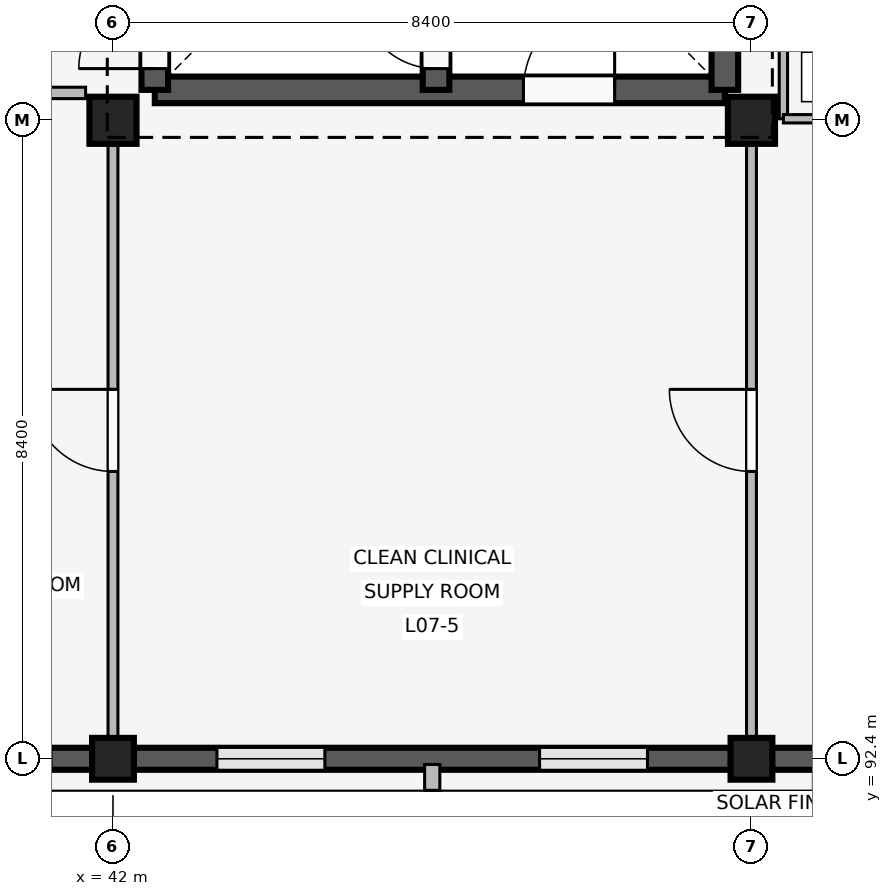
"""IFC4 building model, lengths in metres.
Left out: names, types, materials, properties, quantities, classifications, styles, units other than length and angle.
Written with IfcOpenShell. Run it as: python <this file> out.ifc"""

import sys

from ifc_helpers import new_model, si_unit, direction, frame, frame_2d, origin, origin_2d, place, context, subcontext, project, spatial, rectangle, extrude, element, fill, save


model = new_model("IFC4")
c1 = context("Model", 3, precision=1e-05, world=origin(), true_north=direction((0.0, 1.0)))
c2 = subcontext(c1, "Body", "Model", "MODEL_VIEW")
j1 = project(units=[si_unit("LENGTHUNIT", "METRE"), si_unit("PLANEANGLEUNIT", "RADIAN")], contexts=[c1])
p1 = place(None, origin())
s1 = spatial("IfcSite", under=j1, at=p1, CompositionType="ELEMENT")
p2 = place(p1, origin())
s2 = spatial("IfcBuilding", under=s1, at=p2, CompositionType="ELEMENT")
p3 = place(p2, frame((0.0, 0.0, 28.8)))
s3 = spatial("IfcBuildingStorey", under=s2, at=p3, CompositionType="ELEMENT", Elevation=28.8)
p4 = place(p3, frame((42.0, 92.4, 0.0), z_axis=(0.0, 0.0, 1.0), x_axis=(1.0, 0.0, 0.0)))
e1 = element("IfcColumn", 1, at=p4, inside=s3, PredefinedType="COLUMN", context=c2, shape_type="SweptSolid", body=[
    extrude(rectangle(XDim=0.55, YDim=0.55, at=origin_2d()), origin(), (0.0, 0.0, 1.0), 4.2),
])
p5 = place(p3, frame((42.0, 100.8, 0.0), z_axis=(0.0, 0.0, 1.0), x_axis=(1.0, 0.0, 0.0)))
e2 = element("IfcColumn", 2, at=p5, inside=s3, PredefinedType="COLUMN", context=c2, shape_type="SweptSolid", body=[
    extrude(rectangle(XDim=0.62, YDim=0.62, at=origin_2d()), origin(), (0.0, 0.0, 1.0), 4.2),
])
p6 = place(p3, frame((50.4, 92.4, 0.0), z_axis=(0.0, 0.0, 1.0), x_axis=(1.0, 0.0, 0.0)))
e3 = element("IfcColumn", 3, at=p6, inside=s3, PredefinedType="COLUMN", context=c2, shape_type="SweptSolid", body=[
    extrude(rectangle(XDim=0.55, YDim=0.55, at=origin_2d()), origin(), (0.0, 0.0, 1.0), 4.2),
])
p7 = place(p3, frame((50.4, 100.8, 0.0), z_axis=(0.0, 0.0, 1.0), x_axis=(1.0, 0.0, 0.0)))
e4 = element("IfcColumn", 4, at=p7, inside=s3, PredefinedType="COLUMN", context=c2, shape_type="SweptSolid", body=[
    extrude(rectangle(XDim=0.62, YDim=0.62, at=origin_2d()), origin(), (0.0, 0.0, 1.0), 4.2),
])
p8 = place(p3, frame((41.73, 92.4, 0.0), z_axis=(0.0, 0.0, 1.0), x_axis=(-1.0, 0.0, 0.0)))
e5 = element("IfcWall", 5, at=p8, inside=s3, PredefinedType="SOLIDWALL", context=c2, shape_type="SweptSolid", body=[
    extrude(rectangle(XDim=7.86, YDim=0.29, at=frame_2d((3.93, 0.0))), origin(), (0.0, 0.0, 1.0), 3.34),
])
p9 = place(p8, frame((0.545, 0.0, 0.85)))
e6 = element("IfcOpeningElement", 6, at=p9, cuts=e5, PredefinedType="OPENING", context=c2, shape_type="SweptSolid", body=[
    extrude(rectangle(XDim=1.48, YDim=1.6, at=frame_2d((0.74, 0.8))), frame((0.0, 0.155, 0.0), z_axis=(0.0, -1.0, 0.0), x_axis=(1.0, 0.0, 0.0)), (0.0, 0.0, 1.0), 0.31),
])
p10 = place(p8, frame((5.312, 0.0, 0.85)))
e7 = element("IfcOpeningElement", 7, at=p10, cuts=e5, PredefinedType="OPENING", context=c2, shape_type="SweptSolid", body=[
    extrude(rectangle(XDim=1.48, YDim=1.6, at=frame_2d((0.74, 0.8))), frame((0.0, 0.155, 0.0), z_axis=(0.0, -1.0, 0.0), x_axis=(1.0, 0.0, 0.0)), (0.0, 0.0, 1.0), 0.31),
])
p11 = place(p3, frame((50.13, 92.4, 0.0), z_axis=(0.0, 0.0, 1.0), x_axis=(-1.0, 0.0, 0.0)))
e8 = element("IfcWall", 8, at=p11, inside=s3, PredefinedType="SOLIDWALL", context=c2, shape_type="SweptSolid", body=[
    extrude(rectangle(XDim=7.86, YDim=0.29, at=frame_2d((3.93, 0.0))), origin(), (0.0, 0.0, 1.0), 3.34),
])
p12 = place(p11, frame((1.098, 0.0, 0.85)))
e9 = element("IfcOpeningElement", 9, at=p12, cuts=e8, PredefinedType="OPENING", context=c2, shape_type="SweptSolid", body=[
    extrude(rectangle(XDim=1.42, YDim=1.45, at=frame_2d((0.71, 0.725))), frame((0.0, 0.155, 0.0), z_axis=(0.0, -1.0, 0.0), x_axis=(1.0, 0.0, 0.0)), (0.0, 0.0, 1.0), 0.31),
])
p13 = place(p11, frame((5.342, 0.0, 0.85)))
e10 = element("IfcOpeningElement", 10, at=p13, cuts=e8, PredefinedType="OPENING", context=c2, shape_type="SweptSolid", body=[
    extrude(rectangle(XDim=1.42, YDim=1.45, at=frame_2d((0.71, 0.725))), frame((0.0, 0.155, 0.0), z_axis=(0.0, -1.0, 0.0), x_axis=(1.0, 0.0, 0.0)), (0.0, 0.0, 1.0), 0.31),
])
p14 = place(p3, frame((46.2, 92.325, 0.0), z_axis=(0.0, 0.0, 1.0), x_axis=(0.0, -1.0, 0.0)))
e11 = element("IfcWall", 11, at=p14, inside=s3, PredefinedType="ELEMENTEDWALL", context=c2, shape_type="SweptSolid", body=[
    extrude(rectangle(XDim=0.34, YDim=0.2, at=frame_2d((0.17, 0.0))), origin(), (0.0, 0.0, 1.0), 3.32),
])
p15 = place(p3, frame((58.53, 92.4, 0.0), z_axis=(0.0, 0.0, 1.0), x_axis=(-1.0, 0.0, 0.0)))
e12 = element("IfcWall", 12, at=p15, inside=s3, PredefinedType="SOLIDWALL", context=c2, shape_type="SweptSolid", body=[
    extrude(rectangle(XDim=7.86, YDim=0.29, at=frame_2d((3.93, 0.0))), origin(), (0.0, 0.0, 1.0), 3.34),
])
p16 = place(p15, frame((0.978, 0.0, 0.85)))
e13 = element("IfcOpeningElement", 13, at=p16, cuts=e12, PredefinedType="OPENING", context=c2, shape_type="SweptSolid", body=[
    extrude(rectangle(XDim=1.66, YDim=1.95, at=frame_2d((0.83, 0.975))), frame((0.0, 0.155, 0.0), z_axis=(0.0, -1.0, 0.0), x_axis=(1.0, 0.0, 0.0)), (0.0, 0.0, 1.0), 0.31),
])
p17 = place(p15, frame((5.222, 0.0, 0.85)))
e14 = element("IfcOpeningElement", 14, at=p17, cuts=e12, PredefinedType="OPENING", context=c2, shape_type="SweptSolid", body=[
    extrude(rectangle(XDim=1.66, YDim=1.95, at=frame_2d((0.83, 0.975))), frame((0.0, 0.155, 0.0), z_axis=(0.0, -1.0, 0.0), x_axis=(1.0, 0.0, 0.0)), (0.0, 0.0, 1.0), 0.31),
])
p18 = place(p3, frame((42.55, 101.2, 0.0), z_axis=(0.0, 0.0, 1.0), x_axis=(1.0, 0.0, 0.0)))
e15 = element("IfcWall", 15, at=p18, inside=s3, PredefinedType="SHEAR", context=c2, shape_type="SweptSolid", body=[
    extrude(rectangle(XDim=7.5, YDim=0.35, at=frame_2d((3.75, 0.0))), origin(), (0.0, 0.0, 1.0), 3.94),
])
p19 = place(p18, frame((4.85, 0.0, 0.0)))
e16 = element("IfcOpeningElement", 16, at=p19, cuts=e15, PredefinedType="OPENING", context=c2, shape_type="SweptSolid", body=[
    extrude(rectangle(XDim=1.2, YDim=2.2, at=frame_2d((0.6, 1.1))), frame((0.0, 0.185, 0.0), z_axis=(0.0, -1.0, 0.0), x_axis=(1.0, 0.0, 0.0)), (0.0, 0.0, 1.0), 0.37),
])
p20 = place(p3, frame((42.55, 101.2, 0.0), z_axis=(0.0, 0.0, 1.0), x_axis=(0.0, 1.0, 0.0)))
e17 = element("IfcWall", 17, at=p20, inside=s3, PredefinedType="SHEAR", context=c2, shape_type="SweptSolid", body=[
    extrude(rectangle(XDim=7.55, YDim=0.35, at=frame_2d((3.775, 0.0))), origin(), (0.0, 0.0, 1.0), 3.94),
])
p21 = place(p20, frame((0.28, 0.0, 0.0)))
e18 = element("IfcOpeningElement", 18, at=p21, cuts=e17, PredefinedType="OPENING", context=c2, shape_type="SweptSolid", body=[
    extrude(rectangle(XDim=1.0, YDim=2.15, at=frame_2d((0.5, 1.075))), frame((0.0, 0.185, 0.0), z_axis=(0.0, -1.0, 0.0), x_axis=(1.0, 0.0, 0.0)), (0.0, 0.0, 1.0), 0.37),
])
p22 = place(p3, frame((50.05, 101.2, 0.0), z_axis=(0.0, 0.0, 1.0), x_axis=(0.0, 1.0, 0.0)))
e19 = element("IfcWall", 19, at=p22, inside=s3, PredefinedType="SHEAR", context=c2, shape_type="SweptSolid", body=[
    extrude(rectangle(XDim=7.55, YDim=0.35, at=frame_2d((3.775, 0.0))), origin(), (0.0, 0.0, 1.0), 3.94),
])
p23 = place(p22, frame((2.4, 0.0, 0.0)))
e20 = element("IfcOpeningElement", 20, at=p23, cuts=e19, PredefinedType="OPENING", context=c2, shape_type="SweptSolid", body=[
    extrude(rectangle(XDim=1.2, YDim=2.2, at=frame_2d((0.6, 1.1))), frame((0.0, 0.185, 0.0), z_axis=(0.0, -1.0, 0.0), x_axis=(1.0, 0.0, 0.0)), (0.0, 0.0, 1.0), 0.37),
])
p24 = place(p3, frame((46.25, 101.2, 0.0), z_axis=(0.0, 0.0, 1.0), x_axis=(0.0, 1.0, 0.0)))
e21 = element("IfcWall", 21, at=p24, inside=s3, PredefinedType="SHEAR", context=c2, shape_type="SweptSolid", body=[
    extrude(rectangle(XDim=7.55, YDim=0.35, at=frame_2d((3.775, 0.0))), origin(), (0.0, 0.0, 1.0), 3.94),
])
p25 = place(p24, frame((0.28, 0.0, 0.0)))
e22 = element("IfcOpeningElement", 22, at=p25, cuts=e21, PredefinedType="OPENING", context=c2, shape_type="SweptSolid", body=[
    extrude(rectangle(XDim=1.0, YDim=2.15, at=frame_2d((0.5, 1.075))), frame((0.0, 0.185, 0.0), z_axis=(0.0, -1.0, 0.0), x_axis=(1.0, 0.0, 0.0)), (0.0, 0.0, 1.0), 0.37),
])
p26 = place(p3, frame((39.46, 101.16, 0.0), z_axis=(0.0, 0.0, 1.0), x_axis=(1.0, 0.0, 0.0)))
e23 = element("IfcWall", 23, at=p26, inside=s3, PredefinedType="PARTITIONING", context=c2, shape_type="SweptSolid", body=[
    extrude(rectangle(XDim=2.18, YDim=0.15, at=frame_2d((1.09, 0.0))), origin(), (0.0, 0.0, 1.0), 3.32),
])
p27 = place(p26, frame((0.5, 0.0, 0.0)))
e24 = element("IfcOpeningElement", 24, at=p27, cuts=e23, PredefinedType="OPENING", context=c2, shape_type="SweptSolid", body=[
    extrude(rectangle(XDim=1.08, YDim=2.15, at=frame_2d((0.54, 1.075))), frame((0.0, 0.085, 0.0), z_axis=(0.0, -1.0, 0.0), x_axis=(1.0, 0.0, 0.0)), (0.0, 0.0, 1.0), 0.17),
])
p28 = place(p3, frame((42.0, 92.54, 0.0), z_axis=(0.0, 0.0, 1.0), x_axis=(0.0, 1.0, 0.0)))
e25 = element("IfcWall", 25, at=p28, inside=s3, PredefinedType="PARTITIONING", context=c2, shape_type="SweptSolid", body=[
    extrude(rectangle(XDim=8.21, YDim=0.13, at=frame_2d((4.105, 0.0))), origin(), (0.0, 0.0, 1.0), 3.32),
])
p29 = place(p28, frame((3.64, 0.0, 0.0)))
e26 = element("IfcOpeningElement", 26, at=p29, cuts=e25, PredefinedType="OPENING", context=c2, shape_type="SweptSolid", body=[
    extrude(rectangle(XDim=1.08, YDim=2.15, at=frame_2d((0.54, 1.075))), frame((0.0, 0.075, 0.0), z_axis=(0.0, -1.0, 0.0), x_axis=(1.0, 0.0, 0.0)), (0.0, 0.0, 1.0), 0.15),
])
p30 = place(p3, frame((50.4, 92.54, 0.0), z_axis=(0.0, 0.0, 1.0), x_axis=(0.0, 1.0, 0.0)))
e27 = element("IfcWall", 27, at=p30, inside=s3, PredefinedType="PARTITIONING", context=c2, shape_type="SweptSolid", body=[
    extrude(rectangle(XDim=8.21, YDim=0.13, at=frame_2d((4.105, 0.0))), origin(), (0.0, 0.0, 1.0), 3.32),
])
p31 = place(p30, frame((3.64, 0.0, 0.0)))
e28 = element("IfcOpeningElement", 28, at=p31, cuts=e27, PredefinedType="OPENING", context=c2, shape_type="SweptSolid", body=[
    extrude(rectangle(XDim=1.08, YDim=2.15, at=frame_2d((0.54, 1.075))), frame((0.0, 0.075, 0.0), z_axis=(0.0, -1.0, 0.0), x_axis=(1.0, 0.0, 0.0)), (0.0, 0.0, 1.0), 0.15),
])
p32 = place(p3, frame((50.82, 100.82, 0.0), z_axis=(0.0, 0.0, 1.0), x_axis=(0.0, 1.0, 0.0)))
e29 = element("IfcWall", 29, at=p32, inside=s3, PredefinedType="PARTITIONING", context=c2, shape_type="SweptSolid", body=[
    extrude(rectangle(XDim=2.61, YDim=0.11, at=frame_2d((1.305, 0.0))), origin(), (0.0, 0.0, 1.0), 3.32),
])
p33 = place(p3, frame((50.82, 100.82, 0.0), z_axis=(0.0, 0.0, 1.0), x_axis=(1.0, 0.0, 0.0)))
e30 = element("IfcWall", 30, at=p33, inside=s3, PredefinedType="PARTITIONING", context=c2, shape_type="SweptSolid", body=[
    extrude(rectangle(XDim=1.98, YDim=0.11, at=frame_2d((0.99, 0.0))), origin(), (0.0, 0.0, 1.0), 3.32),
])
p34 = place(p33, frame((0.54, 0.0, 0.0)))
e31 = element("IfcOpeningElement", 31, at=p34, cuts=e30, PredefinedType="OPENING", context=c2, shape_type="SweptSolid", body=[
    extrude(rectangle(XDim=0.9, YDim=2.1, at=frame_2d((0.45, 1.05))), frame((0.0, 0.065, 0.0), z_axis=(0.0, -1.0, 0.0), x_axis=(1.0, 0.0, 0.0)), (0.0, 0.0, 1.0), 0.13),
])
p35 = place(p12, origin())
e32 = element("IfcWindow", 32, at=p35, inside=s3, PartitioningType="SINGLE_PANEL", PredefinedType="WINDOW", context=c2, shape_type="SweptSolid", body=[
    extrude(rectangle(XDim=1.42, YDim=1.45, at=frame_2d((0.71, 0.725))), frame((0.0, 0.03, 0.0), z_axis=(0.0, -1.0, 0.0), x_axis=(1.0, 0.0, 0.0)), (0.0, 0.0, 1.0), 0.06),
])
fill(e9, e32)
p36 = place(p13, origin())
e33 = element("IfcWindow", 33, at=p36, inside=s3, PartitioningType="SINGLE_PANEL", PredefinedType="WINDOW", context=c2, shape_type="SweptSolid", body=[
    extrude(rectangle(XDim=1.42, YDim=1.45, at=frame_2d((0.71, 0.725))), frame((0.0, 0.03, 0.0), z_axis=(0.0, -1.0, 0.0), x_axis=(1.0, 0.0, 0.0)), (0.0, 0.0, 1.0), 0.06),
])
fill(e10, e33)
p37 = place(p19, origin())
e34 = element("IfcDoor", 34, at=p37, inside=s3, OperationType="SINGLE_SWING_RIGHT", PredefinedType="DOOR", context=c2, shape_type="SweptSolid", body=[
    extrude(rectangle(XDim=1.2, YDim=2.2, at=frame_2d((0.6, 1.1))), frame((0.0, 0.025, 0.0), z_axis=(0.0, -1.0, 0.0), x_axis=(1.0, 0.0, 0.0)), (0.0, 0.0, 1.0), 0.05),
])
fill(e16, e34)
p38 = place(p21, origin())
e35 = element("IfcDoor", 35, at=p38, inside=s3, OperationType="SINGLE_SWING_LEFT", PredefinedType="DOOR", context=c2, shape_type="SweptSolid", body=[
    extrude(rectangle(XDim=1.0, YDim=2.15, at=frame_2d((0.5, 1.075))), frame((0.0, 0.025, 0.0), z_axis=(0.0, -1.0, 0.0), x_axis=(1.0, 0.0, 0.0)), (0.0, 0.0, 1.0), 0.05),
])
fill(e18, e35)
p39 = place(p25, origin())
e36 = element("IfcDoor", 36, at=p39, inside=s3, OperationType="SINGLE_SWING_RIGHT", PredefinedType="DOOR", context=c2, shape_type="SweptSolid", body=[
    extrude(rectangle(XDim=1.0, YDim=2.15, at=frame_2d((0.5, 1.075))), frame((0.0, 0.025, 0.0), z_axis=(0.0, -1.0, 0.0), x_axis=(1.0, 0.0, 0.0)), (0.0, 0.0, 1.0), 0.05),
])
fill(e22, e36)
p40 = place(p29, origin())
e37 = element("IfcDoor", 37, at=p40, inside=s3, OperationType="SINGLE_SWING_RIGHT", PredefinedType="DOOR", context=c2, shape_type="SweptSolid", body=[
    extrude(rectangle(XDim=1.08, YDim=2.15, at=frame_2d((0.54, 1.075))), frame((0.0, 0.025, 0.0), z_axis=(0.0, -1.0, 0.0), x_axis=(1.0, 0.0, 0.0)), (0.0, 0.0, 1.0), 0.05),
])
fill(e26, e37)
p41 = place(p31, origin())
e38 = element("IfcDoor", 38, at=p41, inside=s3, OperationType="SINGLE_SWING_RIGHT", PredefinedType="DOOR", context=c2, shape_type="SweptSolid", body=[
    extrude(rectangle(XDim=1.08, YDim=2.15, at=frame_2d((0.54, 1.075))), frame((0.0, 0.025, 0.0), z_axis=(0.0, -1.0, 0.0), x_axis=(1.0, 0.0, 0.0)), (0.0, 0.0, 1.0), 0.05),
])
fill(e28, e38)
save(model, sys.argv[1])
